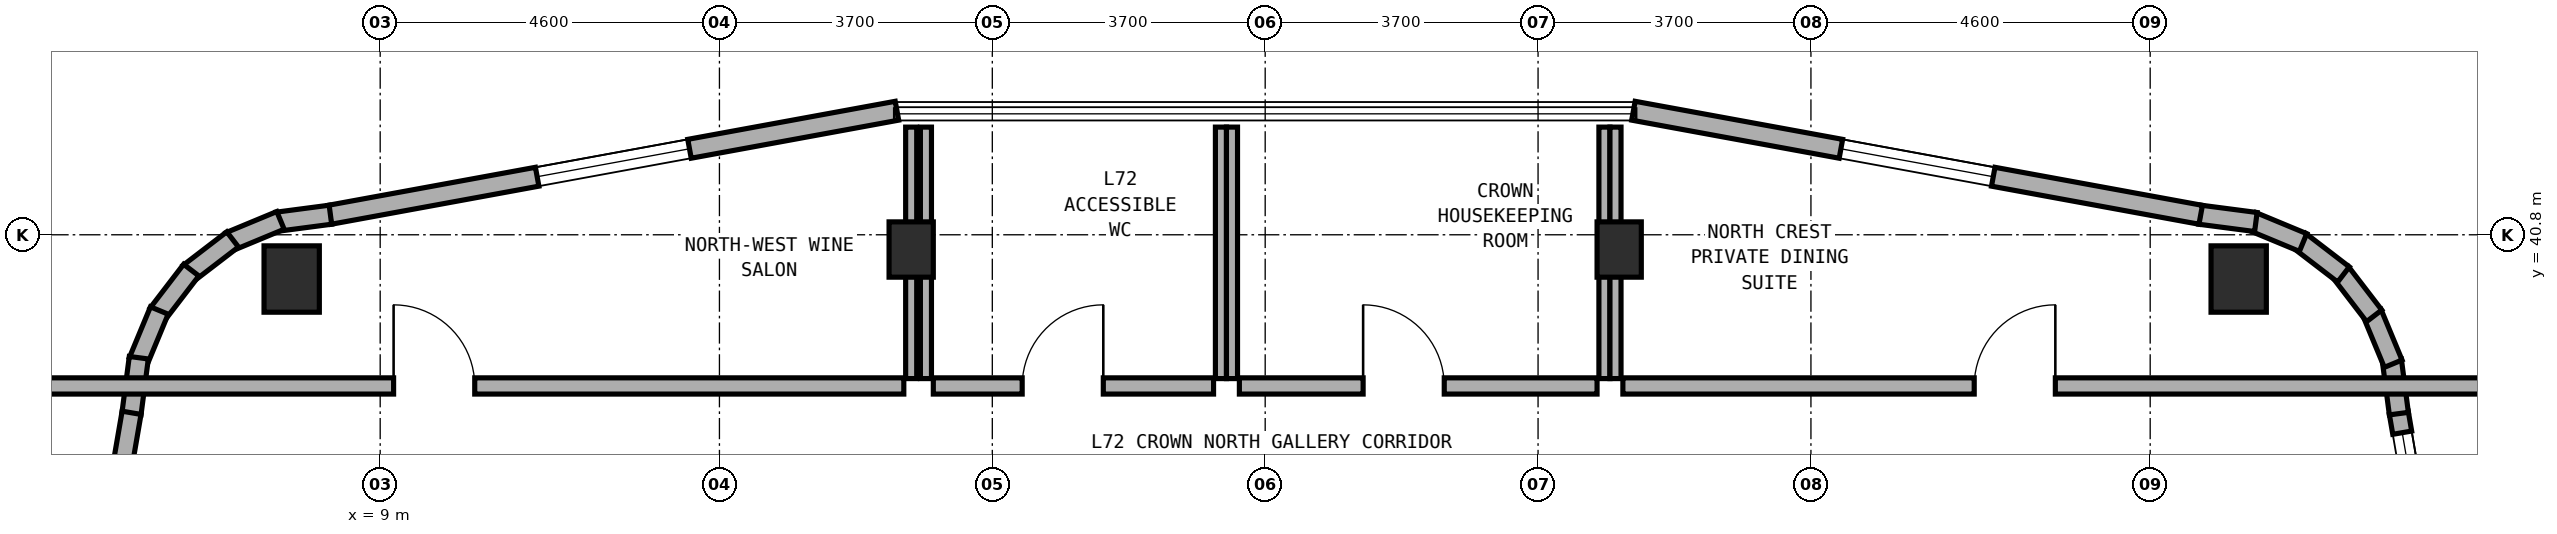
"""IFC4 building model, lengths in metres.
Left out: names, types, materials, properties, quantities, classifications, styles, units other than length and angle.
Written with IfcOpenShell. Run it as: python <this file> out.ifc"""

import sys

from ifc_helpers import new_model, si_unit, direction, frame, frame_2d, origin, origin_2d, place, context, subcontext, project, spatial, rectangle, extrude, element, fill, save


model = new_model("IFC4")
c1 = context("Model", 3, precision=1e-05, world=origin(), true_north=direction((0.0, 1.0)))
c2 = subcontext(c1, "Body", "Model", "MODEL_VIEW")
j1 = project(units=[si_unit("LENGTHUNIT", "METRE"), si_unit("PLANEANGLEUNIT", "RADIAN")], contexts=[c1])
p1 = place(None, origin())
s1 = spatial("IfcSite", under=j1, at=p1, CompositionType="ELEMENT")
p2 = place(p1, origin())
s2 = spatial("IfcBuilding", under=s1, at=p2, CompositionType="ELEMENT")
p3 = place(p2, frame((0.0, 0.0, 264.8)))
s3 = spatial("IfcBuildingStorey", under=s2, at=p3, CompositionType="ELEMENT", Elevation=264.8)
for number, where, z_axis, x_axis in (
    (1, (16.2, 40.6, 0.0), (0.0, 0.0, 1.0), (1.0, 0.0, 0.0)),
    (2, (25.8, 40.6, 0.0), (0.0, 0.0, 1.0), (1.0, 0.0, 0.0)),
):
    element("IfcColumn", number, at=place(p3, frame(where, z_axis=z_axis, x_axis=x_axis)), inside=s3, PredefinedType="COLUMN", context=c2, shape_type="SweptSolid", body=[
        extrude(rectangle(XDim=0.6, YDim=0.75, at=origin_2d()), origin(), (0.0, 0.0, 1.0), 3.6),
    ])
for number, where, z_axis, x_axis in (
    (3, (34.2, 40.2, 0.0), (0.0, 0.0, 1.0), (1.0, 0.0, 0.0)),
    (4, (7.8, 40.2, 0.0), (0.0, 0.0, 1.0), (1.0, 0.0, 0.0)),
):
    element("IfcColumn", number, at=place(p3, frame(where, z_axis=z_axis, x_axis=x_axis)), inside=s3, PredefinedType="COLUMN", context=c2, shape_type="SweptSolid", body=[
        extrude(rectangle(XDim=0.75, YDim=0.9, at=origin_2d()), origin(), (0.0, 0.0, 1.0), 3.6),
    ])
p4 = place(p3, frame((37.781, 30.204, 0.0), z_axis=(0.0, 0.0, 1.0), x_axis=(-0.169818291056, 0.985475391891, 0.0)))
e5 = element("IfcWall", 5, at=p4, inside=s3, PredefinedType="STANDARD", context=c2, shape_type="SweptSolid", body=[
    extrude(rectangle(XDim=8.302, YDim=0.26, at=frame_2d((4.151, 0.0))), origin(), (0.0, 0.0, 1.0), 3.32),
])
p5 = place(p4, frame((2.112, 0.0, 0.85)))
e6 = element("IfcOpeningElement", 6, at=p5, cuts=e5, PredefinedType="OPENING", context=c2, shape_type="SweptSolid", body=[
    extrude(rectangle(XDim=2.1, YDim=1.5, at=frame_2d((1.05, 0.75))), frame((0.0, 0.14, 0.0), z_axis=(0.0, -1.0, 0.0), x_axis=(1.0, 0.0, 0.0)), (0.0, 0.0, 1.0), 0.28),
])
p6 = place(p4, frame((6.829, 0.0, 0.5)))
e7 = element("IfcOpeningElement", 7, at=p6, cuts=e5, PredefinedType="OPENING", context=c2, shape_type="SweptSolid", body=[
    extrude(rectangle(XDim=1.2, YDim=1.9, at=frame_2d((0.6, 0.95))), frame((0.0, 0.14, 0.0), z_axis=(0.0, -1.0, 0.0), x_axis=(1.0, 0.0, 0.0)), (0.0, 0.0, 1.0), 0.28),
])
p7 = place(p3, frame((36.372, 38.375, 0.0), z_axis=(0.0, 0.0, 1.0), x_axis=(-0.130255288807, 0.991480488834, 0.0)))
e8 = element("IfcWall", 8, at=p7, inside=s3, PredefinedType="STANDARD", context=c2, shape_type="SweptSolid", body=[
    extrude(rectangle(XDim=0.729, YDim=0.26, at=frame_2d((0.365, 0.0))), origin(), (0.0, 0.0, 1.0), 3.32),
])
p8 = place(p3, frame((36.295, 39.052, 0.0), z_axis=(0.0, 0.0, 1.0), x_axis=(-0.383267045233, 0.923637576129, 0.0)))
e9 = element("IfcWall", 9, at=p8, inside=s3, PredefinedType="STANDARD", context=c2, shape_type="SweptSolid", body=[
    extrude(rectangle(XDim=0.746, YDim=0.26, at=frame_2d((0.373, 0.0))), origin(), (0.0, 0.0, 1.0), 3.32),
])
for number, where, z_axis, x_axis in (
    (10, (36.037, 39.701, 0.0), (0.0, 0.0, 1.0), (-0.609, 0.793, 0.0)),
    (11, (35.621, 40.262, 0.0), (0.0, 0.0, 1.0), (-0.793, 0.609, 0.0)),
):
    element("IfcWall", number, at=place(p3, frame(where, z_axis=z_axis, x_axis=x_axis)), inside=s3, PredefinedType="STANDARD", context=c2, shape_type="SweptSolid", body=[
        extrude(rectangle(XDim=0.746, YDim=0.26, at=frame_2d((0.373, 0.0))), origin(), (0.0, 0.0, 1.0), 3.32),
    ])
p9 = place(p3, frame((35.073, 40.695, 0.0), z_axis=(0.0, 0.0, 1.0), x_axis=(-0.923637576129, 0.383267045233, 0.0)))
e12 = element("IfcWall", 12, at=p9, inside=s3, PredefinedType="STANDARD", context=c2, shape_type="SweptSolid", body=[
    extrude(rectangle(XDim=0.746, YDim=0.26, at=frame_2d((0.373, 0.0))), origin(), (0.0, 0.0, 1.0), 3.32),
])
p10 = place(p3, frame((34.433, 40.973, 0.0), z_axis=(0.0, 0.0, 1.0), x_axis=(-0.991559404866, 0.129653178221, 0.0)))
e13 = element("IfcWall", 13, at=p10, inside=s3, PredefinedType="STANDARD", context=c2, shape_type="SweptSolid", body=[
    extrude(rectangle(XDim=0.764, YDim=0.26, at=frame_2d((0.382, 0.0))), origin(), (0.0, 0.0, 1.0), 3.32),
])
p11 = place(p3, frame((33.685, 41.071, 0.0), z_axis=(0.0, 0.0, 1.0), x_axis=(-0.983591511167, 0.180409919797, 0.0)))
e14 = element("IfcWall", 14, at=p11, inside=s3, PredefinedType="STANDARD", context=c2, shape_type="SweptSolid", body=[
    extrude(rectangle(XDim=7.821, YDim=0.26, at=frame_2d((3.91, 0.0))), origin(), (0.0, 0.0, 1.0), 3.32),
])
p12 = place(p11, frame((2.86, 0.0, 0.85)))
e15 = element("IfcOpeningElement", 15, at=p12, cuts=e14, PredefinedType="OPENING", context=c2, shape_type="SweptSolid", body=[
    extrude(rectangle(XDim=2.1, YDim=1.5, at=frame_2d((1.05, 0.75))), frame((0.0, 0.14, 0.0), z_axis=(0.0, -1.0, 0.0), x_axis=(1.0, 0.0, 0.0)), (0.0, 0.0, 1.0), 0.28),
])
p13 = place(p3, frame((16.007, 42.482, 0.0), z_axis=(0.0, 0.0, 1.0), x_axis=(-0.983591511167, -0.180409919797, 0.0)))
e16 = element("IfcWall", 16, at=p13, inside=s3, PredefinedType="STANDARD", context=c2, shape_type="SweptSolid", body=[
    extrude(rectangle(XDim=7.821, YDim=0.26, at=frame_2d((3.91, 0.0))), origin(), (0.0, 0.0, 1.0), 3.32),
])
p14 = place(p13, frame((2.86, 0.0, 0.85)))
e17 = element("IfcOpeningElement", 17, at=p14, cuts=e16, PredefinedType="OPENING", context=c2, shape_type="SweptSolid", body=[
    extrude(rectangle(XDim=2.1, YDim=1.5, at=frame_2d((1.05, 0.75))), frame((0.0, 0.14, 0.0), z_axis=(0.0, -1.0, 0.0), x_axis=(1.0, 0.0, 0.0)), (0.0, 0.0, 1.0), 0.28),
])
p15 = place(p3, frame((8.325, 41.072, 0.0), z_axis=(0.0, 0.0, 1.0), x_axis=(-0.991480488834, -0.130255288807, 0.0)))
e18 = element("IfcWall", 18, at=p15, inside=s3, PredefinedType="STANDARD", context=c2, shape_type="SweptSolid", body=[
    extrude(rectangle(XDim=0.729, YDim=0.26, at=frame_2d((0.365, 0.0))), origin(), (0.0, 0.0, 1.0), 3.32),
])
for number, where, z_axis, x_axis in (
    (19, (7.648, 40.995, 0.0), (0.0, 0.0, 1.0), (-0.924, -0.384, 0.0)),
    (20, (6.999, 40.737, 0.0), (0.0, 0.0, 1.0), (-0.793, -0.609, 0.0)),
    (21, (6.438, 40.321, 0.0), (0.0, 0.0, 1.0), (-0.609, -0.793, 0.0)),
):
    element("IfcWall", number, at=place(p3, frame(where, z_axis=z_axis, x_axis=x_axis)), inside=s3, PredefinedType="STANDARD", context=c2, shape_type="SweptSolid", body=[
        extrude(rectangle(XDim=0.746, YDim=0.26, at=frame_2d((0.373, 0.0))), origin(), (0.0, 0.0, 1.0), 3.32),
    ])
p16 = place(p3, frame((6.005, 39.773, 0.0), z_axis=(0.0, 0.0, 1.0), x_axis=(-0.383267045233, -0.923637576129, 0.0)))
e22 = element("IfcWall", 22, at=p16, inside=s3, PredefinedType="STANDARD", context=c2, shape_type="SweptSolid", body=[
    extrude(rectangle(XDim=0.746, YDim=0.26, at=frame_2d((0.373, 0.0))), origin(), (0.0, 0.0, 1.0), 3.32),
])
p17 = place(p3, frame((5.727, 39.133, 0.0), z_axis=(0.0, 0.0, 1.0), x_axis=(-0.129653178221, -0.991559404866, 0.0)))
e23 = element("IfcWall", 23, at=p17, inside=s3, PredefinedType="STANDARD", context=c2, shape_type="SweptSolid", body=[
    extrude(rectangle(XDim=0.764, YDim=0.26, at=frame_2d((0.382, 0.0))), origin(), (0.0, 0.0, 1.0), 3.32),
])
p18 = place(p3, frame((5.629, 38.386, 0.0), z_axis=(0.0, 0.0, 1.0), x_axis=(-0.169818291056, -0.985475391891, 0.0)))
e24 = element("IfcWall", 24, at=p18, inside=s3, PredefinedType="STANDARD", context=c2, shape_type="SweptSolid", body=[
    extrude(rectangle(XDim=8.302, YDim=0.26, at=frame_2d((4.151, 0.0))), origin(), (0.0, 0.0, 1.0), 3.32),
])
p19 = place(p18, frame((1.955, 0.0, 0.85)))
e25 = element("IfcOpeningElement", 25, at=p19, cuts=e24, PredefinedType="OPENING", context=c2, shape_type="SweptSolid", body=[
    extrude(rectangle(XDim=2.1, YDim=1.5, at=frame_2d((1.05, 0.75))), frame((0.0, 0.14, 0.0), z_axis=(0.0, -1.0, 0.0), x_axis=(1.0, 0.0, 0.0)), (0.0, 0.0, 1.0), 0.28),
])
p20 = place(p18, frame((6.515, 0.0, 0.85)))
e26 = element("IfcOpeningElement", 26, at=p20, cuts=e24, PredefinedType="OPENING", context=c2, shape_type="SweptSolid", body=[
    extrude(rectangle(XDim=1.5, YDim=1.5, at=frame_2d((0.75, 0.75))), frame((0.0, 0.14, 0.0), z_axis=(0.0, -1.0, 0.0), x_axis=(1.0, 0.0, 0.0)), (0.0, 0.0, 1.0), 0.28),
])
for number, where, z_axis, x_axis in (
    (27, (16.4, 38.85, 0.0), (0.0, 0.0, 1.0), (0.0, 1.0, 0.0)),
    (28, (20.4, 38.85, 0.0), (0.0, 0.0, 1.0), (0.0, 1.0, 0.0)),
):
    element("IfcWall", number, at=place(p3, frame(where, z_axis=z_axis, x_axis=x_axis)), inside=s3, PredefinedType="PARTITIONING", context=c2, shape_type="SweptSolid", body=[
        extrude(rectangle(XDim=3.41, YDim=0.15, at=frame_2d((1.705, 0.0))), origin(), (0.0, 0.0, 1.0), 3.015),
    ])
p21 = place(p3, frame((16.5, 38.75, 0.0), z_axis=(0.0, 0.0, 1.0), x_axis=(1.0, 0.0, 0.0)))
e29 = element("IfcWall", 29, at=p21, inside=s3, PredefinedType="SOLIDWALL", context=c2, shape_type="SweptSolid", body=[
    extrude(rectangle(XDim=3.8, YDim=0.22, at=frame_2d((1.9, 0.0))), origin(), (0.0, 0.0, 1.0), 2.965),
])
p22 = place(p21, frame((1.205, 0.0, 0.0)))
e30 = element("IfcOpeningElement", 30, at=p22, cuts=e29, PredefinedType="OPENING", context=c2, shape_type="SweptSolid", body=[
    extrude(rectangle(XDim=1.1, YDim=2.1, at=frame_2d((0.55, 1.05))), frame((0.0, 0.12, 0.0), z_axis=(0.0, -1.0, 0.0), x_axis=(1.0, 0.0, 0.0)), (0.0, 0.0, 1.0), 0.24),
])
for number, where, z_axis, x_axis in (
    (31, (20.55, 38.85, 0.0), (0.0, 0.0, 1.0), (0.0, 1.0, 0.0)),
    (32, (25.6, 38.85, 0.0), (0.0, 0.0, 1.0), (0.0, 1.0, 0.0)),
):
    element("IfcWall", number, at=place(p3, frame(where, z_axis=z_axis, x_axis=x_axis)), inside=s3, PredefinedType="PARTITIONING", context=c2, shape_type="SweptSolid", body=[
        extrude(rectangle(XDim=3.41, YDim=0.15, at=frame_2d((1.705, 0.0))), origin(), (0.0, 0.0, 1.0), 3.015),
    ])
p23 = place(p3, frame((20.65, 38.75, 0.0), z_axis=(0.0, 0.0, 1.0), x_axis=(1.0, 0.0, 0.0)))
e33 = element("IfcWall", 33, at=p23, inside=s3, PredefinedType="SOLIDWALL", context=c2, shape_type="SweptSolid", body=[
    extrude(rectangle(XDim=4.85, YDim=0.22, at=frame_2d((2.425, 0.0))), origin(), (0.0, 0.0, 1.0), 2.965),
])
p24 = place(p23, frame((1.678, 0.0, 0.0)))
e34 = element("IfcOpeningElement", 34, at=p24, cuts=e33, PredefinedType="OPENING", context=c2, shape_type="SweptSolid", body=[
    extrude(rectangle(XDim=1.1, YDim=2.1, at=frame_2d((0.55, 1.05))), frame((0.0, 0.12, 0.0), z_axis=(0.0, -1.0, 0.0), x_axis=(1.0, 0.0, 0.0)), (0.0, 0.0, 1.0), 0.24),
])
p25 = place(p3, frame((25.75, 38.85, 0.0), z_axis=(0.0, 0.0, 1.0), x_axis=(0.0, 1.0, 0.0)))
e35 = element("IfcWall", 35, at=p25, inside=s3, PredefinedType="PARTITIONING", context=c2, shape_type="SweptSolid", body=[
    extrude(rectangle(XDim=3.41, YDim=0.15, at=frame_2d((1.705, 0.0))), origin(), (0.0, 0.0, 1.0), 2.795),
])
p26 = place(p3, frame((25.85, 38.75, 0.0), z_axis=(0.0, 0.0, 1.0), x_axis=(1.0, 0.0, 0.0)))
e36 = element("IfcWall", 36, at=p26, inside=s3, PredefinedType="SOLIDWALL", context=c2, shape_type="SweptSolid", body=[
    extrude(rectangle(XDim=11.71, YDim=0.22, at=frame_2d((5.855, 0.0))), origin(), (0.0, 0.0, 1.0), 2.795),
])
p27 = place(p26, frame((4.764, 0.0, 0.0)))
e37 = element("IfcOpeningElement", 37, at=p27, cuts=e36, PredefinedType="OPENING", context=c2, shape_type="SweptSolid", body=[
    extrude(rectangle(XDim=1.1, YDim=2.1, at=frame_2d((0.55, 1.05))), frame((0.0, 0.12, 0.0), z_axis=(0.0, -1.0, 0.0), x_axis=(1.0, 0.0, 0.0)), (0.0, 0.0, 1.0), 0.24),
])
p28 = place(p3, frame((16.2, 38.85, 0.0), z_axis=(0.0, 0.0, 1.0), x_axis=(0.0, 1.0, 0.0)))
e38 = element("IfcWall", 38, at=p28, inside=s3, PredefinedType="PARTITIONING", context=c2, shape_type="SweptSolid", body=[
    extrude(rectangle(XDim=3.41, YDim=0.15, at=frame_2d((1.705, 0.0))), origin(), (0.0, 0.0, 1.0), 2.795),
])
p29 = place(p3, frame((4.44, 38.75, 0.0), z_axis=(0.0, 0.0, 1.0), x_axis=(1.0, 0.0, 0.0)))
e39 = element("IfcWall", 39, at=p29, inside=s3, PredefinedType="SOLIDWALL", context=c2, shape_type="SweptSolid", body=[
    extrude(rectangle(XDim=11.66, YDim=0.22, at=frame_2d((5.83, 0.0))), origin(), (0.0, 0.0, 1.0), 2.795),
])
p30 = place(p29, frame((4.742, 0.0, 0.0)))
e40 = element("IfcOpeningElement", 40, at=p30, cuts=e39, PredefinedType="OPENING", context=c2, shape_type="SweptSolid", body=[
    extrude(rectangle(XDim=1.1, YDim=2.1, at=frame_2d((0.55, 1.05))), frame((0.0, 0.12, 0.0), z_axis=(0.0, -1.0, 0.0), x_axis=(1.0, 0.0, 0.0)), (0.0, 0.0, 1.0), 0.24),
])
p31 = place(p6, origin())
e41 = element("IfcWindow", 41, at=p31, inside=s3, PartitioningType="SINGLE_PANEL", PredefinedType="WINDOW", context=c2, shape_type="SweptSolid", body=[
    extrude(rectangle(XDim=1.2, YDim=1.9, at=frame_2d((0.6, 0.95))), frame((0.0, 0.03, 0.0), z_axis=(0.0, -1.0, 0.0), x_axis=(1.0, 0.0, 0.0)), (0.0, 0.0, 1.0), 0.06),
])
fill(e7, e41)
p32 = place(p12, origin())
e42 = element("IfcWindow", 42, at=p32, inside=s3, PartitioningType="SINGLE_PANEL", PredefinedType="WINDOW", context=c2, shape_type="SweptSolid", body=[
    extrude(rectangle(XDim=2.1, YDim=1.5, at=frame_2d((1.05, 0.75))), frame((0.0, 0.03, 0.0), z_axis=(0.0, -1.0, 0.0), x_axis=(1.0, 0.0, 0.0)), (0.0, 0.0, 1.0), 0.06),
])
fill(e15, e42)
p33 = place(p14, origin())
e43 = element("IfcWindow", 43, at=p33, inside=s3, PartitioningType="SINGLE_PANEL", PredefinedType="WINDOW", context=c2, shape_type="SweptSolid", body=[
    extrude(rectangle(XDim=2.1, YDim=1.5, at=frame_2d((1.05, 0.75))), frame((0.0, 0.03, 0.0), z_axis=(0.0, -1.0, 0.0), x_axis=(1.0, 0.0, 0.0)), (0.0, 0.0, 1.0), 0.06),
])
fill(e17, e43)
p34 = place(p22, origin())
e44 = element("IfcDoor", 44, at=p34, inside=s3, OperationType="SINGLE_SWING_RIGHT", PredefinedType="DOOR", context=c2, shape_type="SweptSolid", body=[
    extrude(rectangle(XDim=1.1, YDim=2.1, at=frame_2d((0.55, 1.05))), frame((0.0, 0.025, 0.0), z_axis=(0.0, -1.0, 0.0), x_axis=(1.0, 0.0, 0.0)), (0.0, 0.0, 1.0), 0.05),
])
fill(e30, e44)
p35 = place(p24, origin())
e45 = element("IfcDoor", 45, at=p35, inside=s3, OperationType="SINGLE_SWING_LEFT", PredefinedType="DOOR", context=c2, shape_type="SweptSolid", body=[
    extrude(rectangle(XDim=1.1, YDim=2.1, at=frame_2d((0.55, 1.05))), frame((0.0, 0.025, 0.0), z_axis=(0.0, -1.0, 0.0), x_axis=(1.0, 0.0, 0.0)), (0.0, 0.0, 1.0), 0.05),
])
fill(e34, e45)
p36 = place(p27, origin())
e46 = element("IfcDoor", 46, at=p36, inside=s3, OperationType="SINGLE_SWING_RIGHT", PredefinedType="DOOR", context=c2, shape_type="SweptSolid", body=[
    extrude(rectangle(XDim=1.1, YDim=2.1, at=frame_2d((0.55, 1.05))), frame((0.0, 0.025, 0.0), z_axis=(0.0, -1.0, 0.0), x_axis=(1.0, 0.0, 0.0)), (0.0, 0.0, 1.0), 0.05),
])
fill(e37, e46)
p37 = place(p30, origin())
e47 = element("IfcDoor", 47, at=p37, inside=s3, OperationType="SINGLE_SWING_LEFT", PredefinedType="DOOR", context=c2, shape_type="SweptSolid", body=[
    extrude(rectangle(XDim=1.1, YDim=2.1, at=frame_2d((0.55, 1.05))), frame((0.0, 0.025, 0.0), z_axis=(0.0, -1.0, 0.0), x_axis=(1.0, 0.0, 0.0)), (0.0, 0.0, 1.0), 0.05),
])
fill(e40, e47)
save(model, sys.argv[1])
